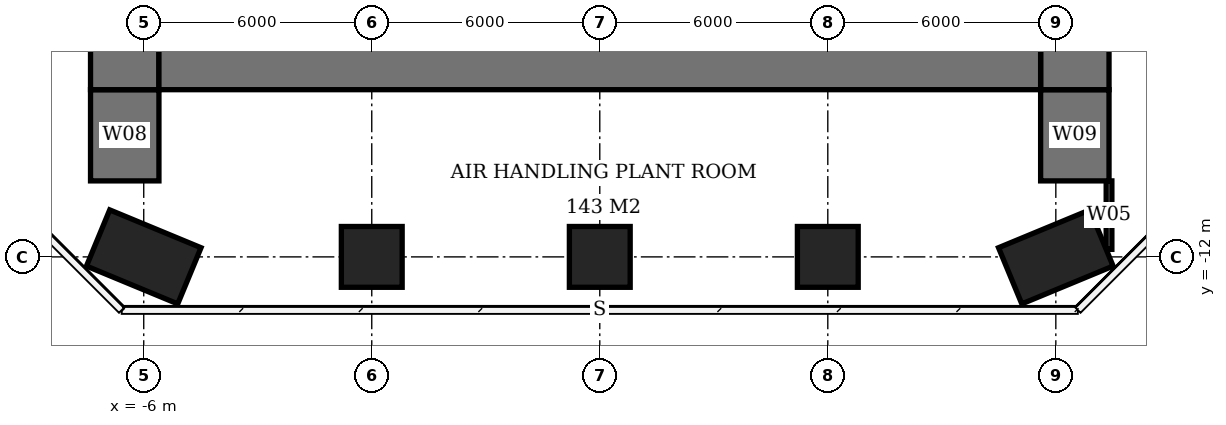
"""IFC4 building model, lengths in metres.
Left out: names, types, materials, properties, quantities, classifications, styles, units other than length and angle.
Written with IfcOpenShell. Run it as: python <this file> out.ifc"""

import sys

from ifc_helpers import new_model, si_unit, direction, frame, frame_2d, origin, origin_2d, place, context, subcontext, project, spatial, rectangle, extrude, element, save


model = new_model("IFC4")
c1 = context("Model", 3, precision=1e-05, world=origin(), true_north=direction((0.0, 1.0)))
c2 = subcontext(c1, "Body", "Model", "MODEL_VIEW")
j1 = project(units=[si_unit("LENGTHUNIT", "METRE"), si_unit("PLANEANGLEUNIT", "RADIAN")], contexts=[c1])
p1 = place(None, origin())
s1 = spatial("IfcSite", under=j1, at=p1, CompositionType="ELEMENT")
p2 = place(p1, origin())
s2 = spatial("IfcBuilding", under=s1, at=p2, CompositionType="ELEMENT")
p3 = place(p2, frame((0.0, 0.0, 295.7)))
s3 = spatial("IfcBuildingStorey", under=s2, at=p3, CompositionType="ELEMENT", Elevation=295.7)
p4 = place(p3, frame((-6.0, -12.0, 0.0), z_axis=(0.0, 0.0, 1.0), x_axis=(-0.923879532511, 0.382683432365, 0.0)))
e1 = element("IfcColumn", 1, at=p4, inside=s3, PredefinedType="COLUMN", context=c2, shape_type="SweptSolid", body=[
    extrude(rectangle(XDim=2.6, YDim=1.6, at=origin_2d()), origin(), (0.0, 0.0, 1.0), 5.0),
])
for number, where, z_axis, x_axis in (
    (2, (0.0, -12.0, 0.0), (0.0, 0.0, 1.0), (1.0, 0.0, 0.0)),
    (3, (6.0, -12.0, 0.0), (0.0, 0.0, 1.0), (1.0, 0.0, 0.0)),
    (4, (12.0, -12.0, 0.0), (0.0, 0.0, 1.0), (1.0, 0.0, 0.0)),
):
    element("IfcColumn", number, at=place(p3, frame(where, z_axis=z_axis, x_axis=x_axis)), inside=s3, PredefinedType="COLUMN", context=c2, shape_type="SweptSolid", body=[
        extrude(rectangle(XDim=1.6, YDim=1.6, at=origin_2d()), origin(), (0.0, 0.0, 1.0), 5.0),
    ])
p5 = place(p3, frame((18.0, -12.0, 0.0), z_axis=(0.0, 0.0, 1.0), x_axis=(-0.923879532511, -0.382683432365, 0.0)))
e5 = element("IfcColumn", 5, at=p5, inside=s3, PredefinedType="COLUMN", context=c2, shape_type="SweptSolid", body=[
    extrude(rectangle(XDim=2.6, YDim=1.6, at=origin_2d()), origin(), (0.0, 0.0, 1.0), 5.0),
])
p6 = place(p3, frame((-5.6, -6.6, 0.0), z_axis=(0.0, 0.0, 1.0), x_axis=(1.0, 0.0, 0.0)))
e6 = element("IfcWall", 6, at=p6, inside=s3, PredefinedType="SHEAR", context=c2, shape_type="SweptSolid", body=[
    extrude(rectangle(XDim=23.2, YDim=2.0, at=frame_2d((11.6, 0.0))), origin(), (0.0, 0.0, 1.0), 5.0),
])
p7 = place(p3, frame((-6.5, -7.6, 0.0), z_axis=(0.0, 0.0, 1.0), x_axis=(0.0, 1.0, 0.0)))
e7 = element("IfcWall", 7, at=p7, inside=s3, PredefinedType="SHEAR", context=c2, shape_type="SweptSolid", body=[
    extrude(rectangle(XDim=21.2, YDim=1.8, at=frame_2d((10.6, 0.0))), origin(), (0.0, 0.0, 1.0), 5.0),
])
p8 = place(p7, frame((7.8, 0.0, 0.0)))
e8 = element("IfcOpeningElement", 8, at=p8, cuts=e7, PredefinedType="OPENING", context=c2, shape_type="SweptSolid", body=[
    extrude(rectangle(XDim=1.8, YDim=2.4, at=frame_2d((0.9, 1.2))), frame((0.0, 0.91, 0.0), z_axis=(0.0, -1.0, 0.0), x_axis=(1.0, 0.0, 0.0)), (0.0, 0.0, 1.0), 1.82),
])
p9 = place(p3, frame((18.5, -7.6, 0.0), z_axis=(0.0, 0.0, 1.0), x_axis=(0.0, 1.0, 0.0)))
e9 = element("IfcWall", 9, at=p9, inside=s3, PredefinedType="SHEAR", context=c2, shape_type="SweptSolid", body=[
    extrude(rectangle(XDim=21.2, YDim=1.8, at=frame_2d((10.6, 0.0))), origin(), (0.0, 0.0, 1.0), 5.0),
])
p10 = place(p9, frame((9.2, 0.0, 0.0)))
e10 = element("IfcOpeningElement", 10, at=p10, cuts=e9, PredefinedType="OPENING", context=c2, shape_type="SweptSolid", body=[
    extrude(rectangle(XDim=1.8, YDim=2.4, at=frame_2d((0.9, 1.2))), frame((0.0, 0.91, 0.0), z_axis=(0.0, -1.0, 0.0), x_axis=(1.0, 0.0, 0.0)), (0.0, 0.0, 1.0), 1.82),
])
for number, where, z_axis, x_axis in (
    (11, (-6.5, -10.0, 0.0), (0.0, 0.0, 1.0), (0.0, 1.0, 0.0)),
    (12, (18.5, -10.0, 0.0), (0.0, 0.0, 1.0), (0.0, 1.0, 0.0)),
):
    element("IfcWall", number, at=place(p3, frame(where, z_axis=z_axis, x_axis=x_axis)), inside=s3, PredefinedType="SHEAR", context=c2, shape_type="SweptSolid", body=[
        extrude(rectangle(XDim=2.4, YDim=1.8, at=frame_2d((1.2, 0.0))), origin(), (0.0, 0.0, 1.0), 5.0),
    ])
p11 = place(p3, frame((-6.487, -19.175, 0.0), z_axis=(0.0, 0.0, 1.0), x_axis=(-0.707106781187, 0.707106781187, 0.0)))
e13 = element("IfcWall", 13, at=p11, inside=s3, PredefinedType="PARAPET", context=c2, shape_type="SweptSolid", body=[
    extrude(rectangle(XDim=9.458, YDim=0.25, at=frame_2d((4.729, 0.0))), origin(), (0.0, 0.0, 1.0), 1.1),
])
p12 = place(p3, frame((19.4, -11.802, 0.0), z_axis=(0.0, 0.0, 1.0), x_axis=(0.0, 1.0, 0.0)))
e14 = element("IfcWall", 14, at=p12, inside=s3, PredefinedType="PARTITIONING", context=c2, shape_type="SweptSolid", body=[
    extrude(rectangle(XDim=1.802, YDim=0.15, at=frame_2d((0.901, 0.0))), origin(), (0.0, 0.0, 1.0), 4.75),
])
save(model, sys.argv[1])
